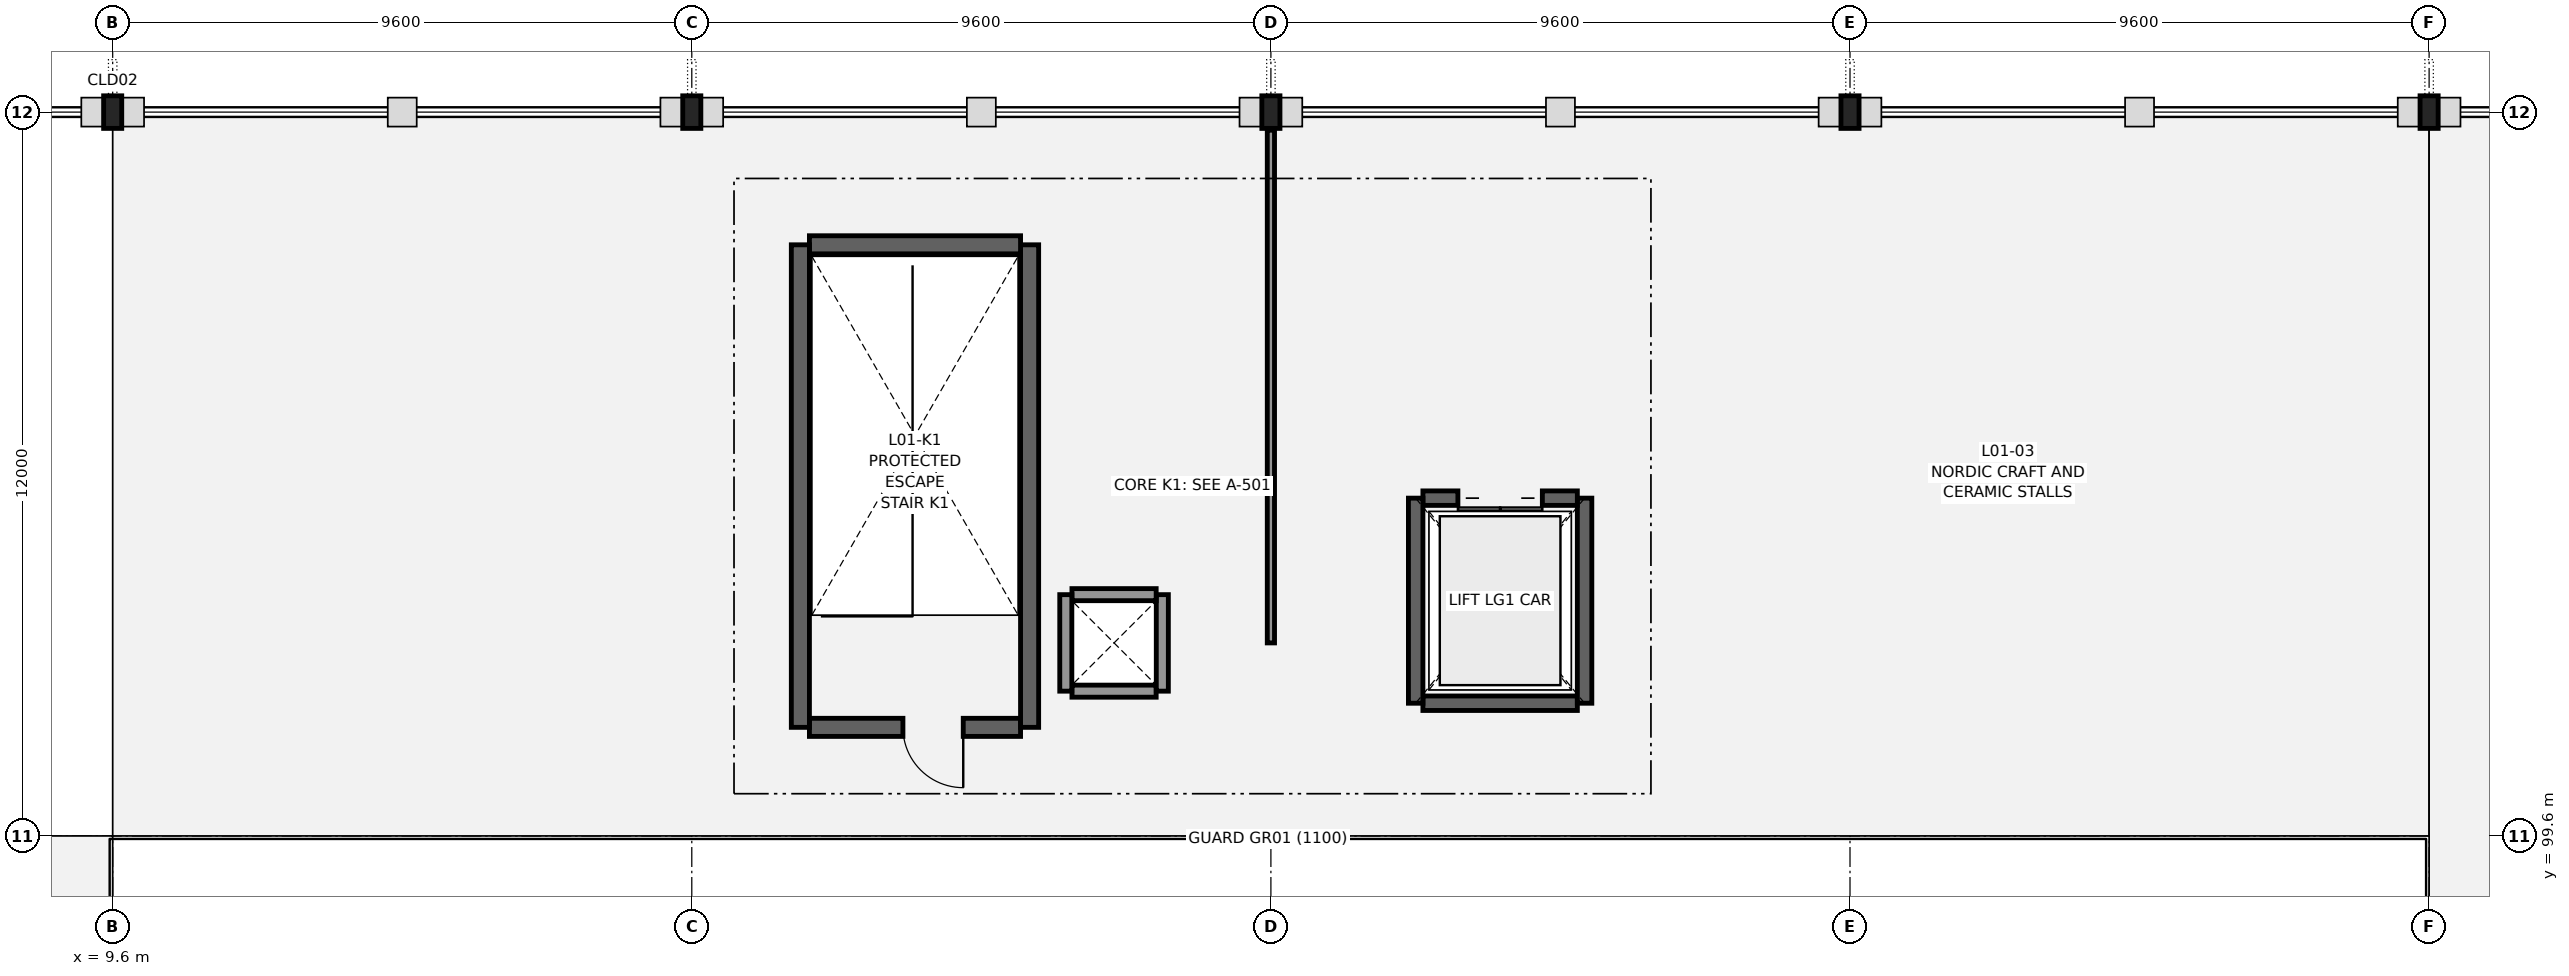
"""IFC4 building model, lengths in metres.
Left out: names, types, materials, properties, quantities, classifications, styles, units other than length and angle.
Written with IfcOpenShell. Run it as: python <this file> out.ifc"""

import sys

from ifc_helpers import new_model, si_unit, direction, frame, frame_2d, origin, origin_2d, place, context, subcontext, project, spatial, rectangle, i_section, extrude, element, fill, save


model = new_model("IFC4")
c1 = context("Model", 3, precision=1e-05, world=origin(), true_north=direction((0.0, 1.0)))
c2 = subcontext(c1, "Body", "Model", "MODEL_VIEW")
j1 = project(units=[si_unit("LENGTHUNIT", "METRE"), si_unit("PLANEANGLEUNIT", "RADIAN")], contexts=[c1])
p1 = place(None, origin())
s1 = spatial("IfcSite", under=j1, at=p1, CompositionType="ELEMENT")
p2 = place(p1, origin())
s2 = spatial("IfcBuilding", under=s1, at=p2, CompositionType="ELEMENT")
p3 = place(p2, frame((0.0, 0.0, 5.4)))
s3 = spatial("IfcBuildingStorey", under=s2, at=p3, CompositionType="ELEMENT", Elevation=5.4)
for number, where, z_axis, x_axis in (
    (1, (9.6, 111.6, 0.0), (0.0, 0.0, 1.0), (1.0, 0.0, 0.0)),
    (2, (19.2, 111.6, 0.0), (0.0, 0.0, 1.0), (1.0, 0.0, 0.0)),
    (3, (28.8, 111.6, 0.0), (0.0, 0.0, 1.0), (1.0, 0.0, 0.0)),
    (4, (38.4, 111.6, 0.0), (0.0, 0.0, 1.0), (1.0, 0.0, 0.0)),
    (5, (48.0, 111.6, 0.0), (0.0, 0.0, 1.0), (1.0, 0.0, 0.0)),
):
    element("IfcColumn", number, at=place(p3, frame(where, z_axis=z_axis, x_axis=x_axis)), inside=s3, PredefinedType="COLUMN", context=c2, shape_type="SweptSolid", body=[
        extrude(i_section(OverallWidth=0.3, OverallDepth=0.54, WebThickness=0.012, FlangeThickness=0.024, FilletRadius=0.027, at=origin_2d()), origin(), (0.0, 0.0, 1.0), 4.8),
    ])
p4 = place(p3, frame((24.65, 101.4, 0.0), z_axis=(0.0, 0.0, 1.0), x_axis=(-1.0, 0.0, 0.0)))
e6 = element("IfcWall", 6, at=p4, inside=s3, PredefinedType="SHEAR", context=c2, shape_type="SweptSolid", body=[
    extrude(rectangle(XDim=3.5, YDim=0.3, at=frame_2d((1.75, 0.0))), origin(), (0.0, 0.0, 1.0), 4.5),
])
p5 = place(p4, frame((0.95, 0.0, 0.0)))
e7 = element("IfcOpeningElement", 7, at=p5, cuts=e6, PredefinedType="OPENING", context=c2, shape_type="SweptSolid", body=[
    extrude(rectangle(XDim=1.0, YDim=2.15, at=frame_2d((0.5, 1.075))), frame((0.0, 0.16, 0.0), z_axis=(0.0, -1.0, 0.0), x_axis=(1.0, 0.0, 0.0)), (0.0, 0.0, 1.0), 0.32),
])
p6 = place(p3, frame((24.8, 101.4, 0.0), z_axis=(0.0, 0.0, 1.0), x_axis=(0.0, 1.0, 0.0)))
e8 = element("IfcWall", 8, at=p6, inside=s3, PredefinedType="SHEAR", context=c2, shape_type="SweptSolid", body=[
    extrude(rectangle(XDim=8.0, YDim=0.3, at=frame_2d((4.0, 0.0))), origin(), (0.0, 0.0, 1.0), 4.5),
])
p7 = place(p3, frame((24.65, 109.4, 0.0), z_axis=(0.0, 0.0, 1.0), x_axis=(-1.0, 0.0, 0.0)))
e9 = element("IfcWall", 9, at=p7, inside=s3, PredefinedType="SHEAR", context=c2, shape_type="SweptSolid", body=[
    extrude(rectangle(XDim=3.5, YDim=0.3, at=frame_2d((1.75, 0.0))), origin(), (0.0, 0.0, 1.0), 4.5),
])
p8 = place(p3, frame((21.0, 109.4, 0.0), z_axis=(0.0, 0.0, 1.0), x_axis=(0.0, -1.0, 0.0)))
e10 = element("IfcWall", 10, at=p8, inside=s3, PredefinedType="SHEAR", context=c2, shape_type="SweptSolid", body=[
    extrude(rectangle(XDim=8.0, YDim=0.3, at=frame_2d((4.0, 0.0))), origin(), (0.0, 0.0, 1.0), 4.5),
])
p9 = place(p3, frame((31.32, 101.8, 0.0), z_axis=(0.0, 0.0, 1.0), x_axis=(1.0, 0.0, 0.0)))
e11 = element("IfcWall", 11, at=p9, inside=s3, PredefinedType="SHEAR", context=c2, shape_type="SweptSolid", body=[
    extrude(rectangle(XDim=2.56, YDim=0.24, at=frame_2d((1.28, 0.0))), origin(), (0.0, 0.0, 1.0), 4.5),
])
p10 = place(p3, frame((34.0, 101.8, 0.0), z_axis=(0.0, 0.0, 1.0), x_axis=(0.0, 1.0, 0.0)))
e12 = element("IfcWall", 12, at=p10, inside=s3, PredefinedType="SHEAR", context=c2, shape_type="SweptSolid", body=[
    extrude(rectangle(XDim=3.4, YDim=0.24, at=frame_2d((1.7, 0.0))), origin(), (0.0, 0.0, 1.0), 4.5),
])
p11 = place(p3, frame((33.88, 105.2, 0.0), z_axis=(0.0, 0.0, 1.0), x_axis=(-1.0, 0.0, 0.0)))
e13 = element("IfcWall", 13, at=p11, inside=s3, PredefinedType="SHEAR", context=c2, shape_type="SweptSolid", body=[
    extrude(rectangle(XDim=2.56, YDim=0.24, at=frame_2d((1.28, 0.0))), origin(), (0.0, 0.0, 1.0), 4.5),
])
p12 = place(p11, frame((0.58, 0.0, 0.0)))
e14 = element("IfcOpeningElement", 14, at=p12, cuts=e13, PredefinedType="OPENING", context=c2, shape_type="SweptSolid", body=[
    extrude(rectangle(XDim=1.4, YDim=2.25, at=frame_2d((0.7, 1.125))), frame((0.0, 0.13, 0.0), z_axis=(0.0, -1.0, 0.0), x_axis=(1.0, 0.0, 0.0)), (0.0, 0.0, 1.0), 0.26),
])
p13 = place(p3, frame((31.2, 105.2, 0.0), z_axis=(0.0, 0.0, 1.0), x_axis=(0.0, -1.0, 0.0)))
e15 = element("IfcWall", 15, at=p13, inside=s3, PredefinedType="SHEAR", context=c2, shape_type="SweptSolid", body=[
    extrude(rectangle(XDim=3.4, YDim=0.24, at=frame_2d((1.7, 0.0))), origin(), (0.0, 0.0, 1.0), 4.5),
])
p14 = place(p3, frame((28.8, 102.8, 0.0), z_axis=(0.0, 0.0, 1.0), x_axis=(0.0, 1.0, 0.0)))
e16 = element("IfcWall", 16, at=p14, inside=s3, PredefinedType="PARTITIONING", context=c2, shape_type="SweptSolid", body=[
    extrude(rectangle(XDim=8.5, YDim=0.12, at=frame_2d((4.25, 0.0))), origin(), (0.0, 0.0, 1.0), 2.4),
])
p15 = place(p3, frame((25.502, 102.0, 0.0), z_axis=(0.0, 0.0, 1.0), x_axis=(1.0, 0.0, 0.0)))
e17 = element("IfcWall", 17, at=p15, inside=s3, PredefinedType="PARTITIONING", context=c2, shape_type="SweptSolid", body=[
    extrude(rectangle(XDim=1.396, YDim=0.2, at=frame_2d((0.698, 0.0))), origin(), (0.0, 0.0, 1.0), 4.44),
])
p16 = place(p3, frame((27.0, 102.0, 0.0), z_axis=(0.0, 0.0, 1.0), x_axis=(0.0, 1.0, 0.0)))
e18 = element("IfcWall", 18, at=p16, inside=s3, PredefinedType="PARTITIONING", context=c2, shape_type="SweptSolid", body=[
    extrude(rectangle(XDim=1.6, YDim=0.2, at=frame_2d((0.8, 0.0))), origin(), (0.0, 0.0, 1.0), 4.44),
])
p17 = place(p3, frame((26.898, 103.6, 0.0), z_axis=(0.0, 0.0, 1.0), x_axis=(-1.0, 0.0, 0.0)))
e19 = element("IfcWall", 19, at=p17, inside=s3, PredefinedType="PARTITIONING", context=c2, shape_type="SweptSolid", body=[
    extrude(rectangle(XDim=1.396, YDim=0.2, at=frame_2d((0.698, 0.0))), origin(), (0.0, 0.0, 1.0), 4.44),
])
p18 = place(p3, frame((25.4, 103.6, 0.0), z_axis=(0.0, 0.0, 1.0), x_axis=(0.0, -1.0, 0.0)))
e20 = element("IfcWall", 20, at=p18, inside=s3, PredefinedType="PARTITIONING", context=c2, shape_type="SweptSolid", body=[
    extrude(rectangle(XDim=1.6, YDim=0.2, at=frame_2d((0.8, 0.0))), origin(), (0.0, 0.0, 1.0), 4.44),
])
p19 = place(p5, origin())
e21 = element("IfcDoor", 21, at=p19, inside=s3, OperationType="SINGLE_SWING_LEFT", PredefinedType="DOOR", context=c2, shape_type="SweptSolid", body=[
    extrude(rectangle(XDim=1.0, YDim=2.15, at=frame_2d((0.5, 1.075))), frame((0.0, 0.025, 0.0), z_axis=(0.0, -1.0, 0.0), x_axis=(1.0, 0.0, 0.0)), (0.0, 0.0, 1.0), 0.05),
])
fill(e7, e21)
p20 = place(p12, origin())
e22 = element("IfcDoor", 22, at=p20, inside=s3, OperationType="DOUBLE_DOOR_SLIDING", PredefinedType="DOOR", context=c2, shape_type="SweptSolid", body=[
    extrude(rectangle(XDim=1.4, YDim=2.25, at=frame_2d((0.7, 1.125))), frame((0.0, 0.025, 0.0), z_axis=(0.0, -1.0, 0.0), x_axis=(1.0, 0.0, 0.0)), (0.0, 0.0, 1.0), 0.05),
])
fill(e14, e22)
save(model, sys.argv[1])
